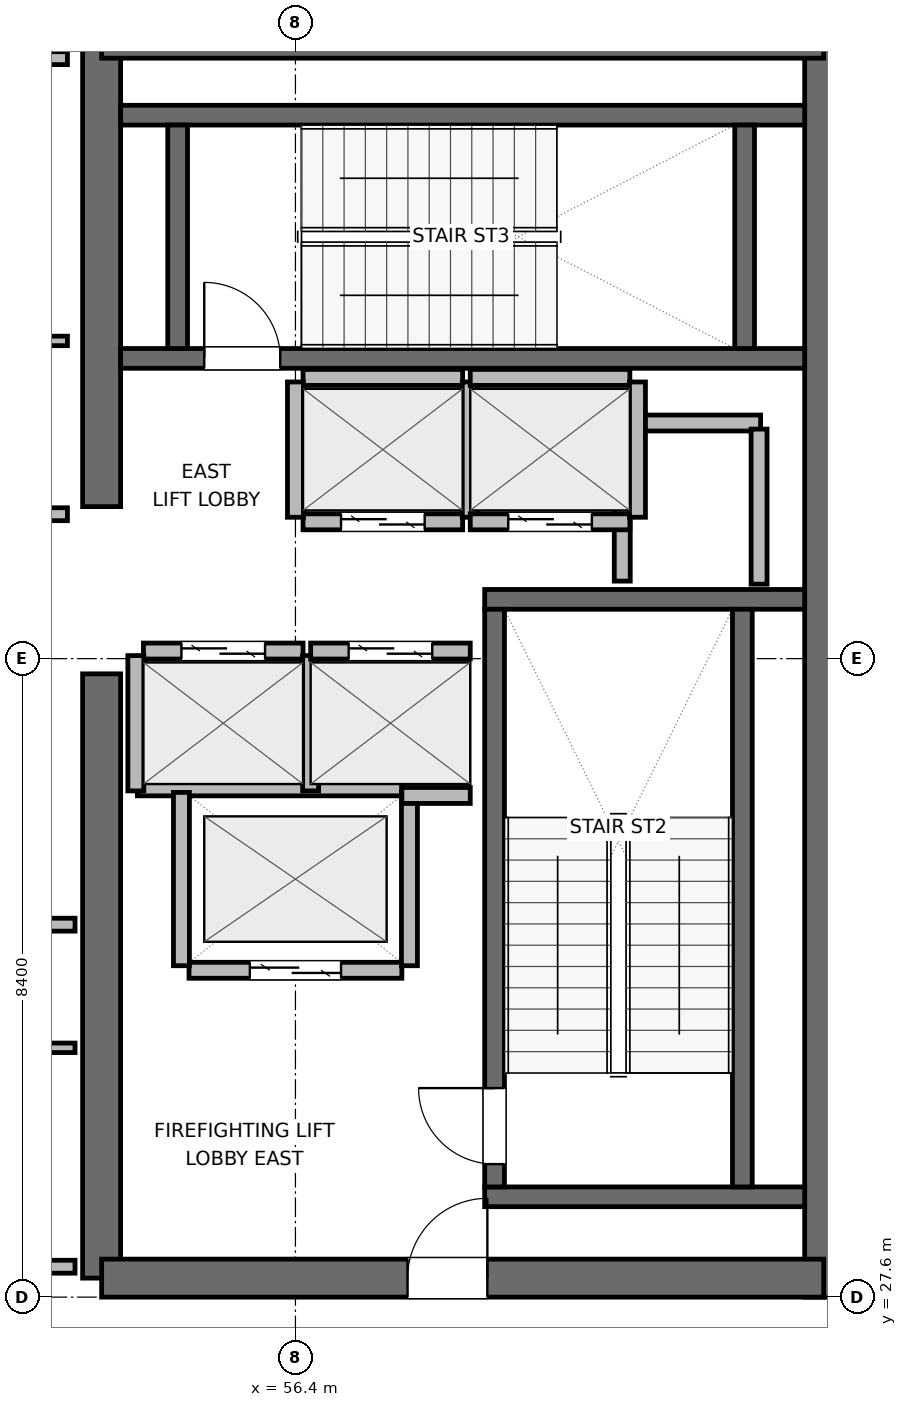
"""IFC4 building model, lengths in metres.
Left out: names, types, materials, properties, quantities, classifications, styles, units other than length and angle.
Written with IfcOpenShell. Run it as: python <this file> out.ifc"""

import sys

from ifc_helpers import new_model, si_unit, direction, frame, frame_2d, origin, place, context, subcontext, project, spatial, rectangle, extrude, element, fill, save


model = new_model("IFC4")
c1 = context("Model", 3, precision=1e-05, world=origin(), true_north=direction((0.0, 1.0)))
c2 = subcontext(c1, "Body", "Model", "MODEL_VIEW")
j1 = project(units=[si_unit("LENGTHUNIT", "METRE"), si_unit("PLANEANGLEUNIT", "RADIAN")], contexts=[c1])
p1 = place(None, origin())
s1 = spatial("IfcSite", under=j1, at=p1, CompositionType="ELEMENT")
p2 = place(p1, origin())
s2 = spatial("IfcBuilding", under=s1, at=p2, CompositionType="ELEMENT")
p3 = place(p2, frame((0.0, 0.0, 350.4)))
s3 = spatial("IfcBuildingStorey", under=s2, at=p3, CompositionType="ELEMENT", Elevation=350.4)
p4 = place(p3, frame((53.85, 27.85, 0.0), z_axis=(0.0, 0.0, 1.0), x_axis=(0.0, 1.0, 0.0)))
e1 = element("IfcWall", 1, at=p4, inside=s3, PredefinedType="SHEAR", context=c2, shape_type="SweptSolid", body=[
    extrude(rectangle(XDim=7.95, YDim=0.5, at=frame_2d((3.975, 0.0))), origin(), (0.0, 0.0, 1.0), 4.5),
])
p5 = place(p3, frame((53.85, 38.0, 0.0), z_axis=(0.0, 0.0, 1.0), x_axis=(0.0, 1.0, 0.0)))
e2 = element("IfcWall", 2, at=p5, inside=s3, PredefinedType="SHEAR", context=c2, shape_type="SweptSolid", body=[
    extrude(rectangle(XDim=6.15, YDim=0.5, at=frame_2d((3.075, 0.0))), origin(), (0.0, 0.0, 1.0), 4.5),
])
p6 = place(p3, frame((63.35, 27.6, 0.0), z_axis=(0.0, 0.0, 1.0), x_axis=(0.0, 1.0, 0.0)))
e3 = element("IfcWall", 3, at=p6, inside=s3, PredefinedType="SHEAR", context=c2, shape_type="SweptSolid", body=[
    extrude(rectangle(XDim=16.8, YDim=0.5, at=frame_2d((8.4, 0.0))), origin(), (0.0, 0.0, 1.0), 4.5),
])
p7 = place(p3, frame((53.85, 27.85, 0.0), z_axis=(0.0, 0.0, 1.0), x_axis=(1.0, 0.0, 0.0)))
e4 = element("IfcWall", 4, at=p7, inside=s3, PredefinedType="SHEAR", context=c2, shape_type="SweptSolid", body=[
    extrude(rectangle(XDim=9.5, YDim=0.5, at=frame_2d((4.75, 0.0))), origin(), (0.0, 0.0, 1.0), 4.5),
])
p8 = place(p7, frame((4.025, 0.0, 0.0)))
e5 = element("IfcOpeningElement", 5, at=p8, cuts=e4, PredefinedType="OPENING", context=c2, shape_type="SweptSolid", body=[
    extrude(rectangle(XDim=1.05, YDim=2.04, at=frame_2d((0.525, 1.02))), frame((0.0, 0.26, 0.0), z_axis=(0.0, -1.0, 0.0), x_axis=(1.0, 0.0, 0.0)), (0.0, 0.0, 1.0), 0.52),
])
p9 = place(p3, frame((53.85, 44.15, 0.0), z_axis=(0.0, 0.0, 1.0), x_axis=(1.0, 0.0, 0.0)))
e6 = element("IfcWall", 6, at=p9, inside=s3, PredefinedType="SHEAR", context=c2, shape_type="SweptSolid", body=[
    extrude(rectangle(XDim=9.5, YDim=0.5, at=frame_2d((4.75, 0.0))), origin(), (0.0, 0.0, 1.0), 4.5),
])
for number, where, z_axis, x_axis in (
    (7, (58.89, 28.92, 0.0), (0.0, 0.0, 1.0), (1.0, 0.0, 0.0)),
    (8, (58.89, 36.78, 0.0), (0.0, 0.0, 1.0), (1.0, 0.0, 0.0)),
):
    element("IfcWall", number, at=place(p3, frame(where, z_axis=z_axis, x_axis=x_axis)), inside=s3, PredefinedType="SHEAR", context=c2, shape_type="SweptSolid", body=[
        extrude(rectangle(XDim=4.21, YDim=0.26, at=frame_2d((2.105, 0.0))), origin(), (0.0, 0.0, 1.0), 4.5),
    ])
p10 = place(p3, frame((59.02, 29.05, 0.0), z_axis=(0.0, 0.0, 1.0), x_axis=(0.0, 1.0, 0.0)))
e9 = element("IfcWall", 9, at=p10, inside=s3, PredefinedType="SHEAR", context=c2, shape_type="SweptSolid", body=[
    extrude(rectangle(XDim=7.6, YDim=0.26, at=frame_2d((3.8, 0.0))), origin(), (0.0, 0.0, 1.0), 4.5),
])
p11 = place(p10, frame((0.3, 0.0, 0.0)))
e10 = element("IfcOpeningElement", 10, at=p11, cuts=e9, PredefinedType="OPENING", context=c2, shape_type="SweptSolid", body=[
    extrude(rectangle(XDim=1.0, YDim=2.04, at=frame_2d((0.5, 1.02))), frame((0.0, 0.14, 0.0), z_axis=(0.0, -1.0, 0.0), x_axis=(1.0, 0.0, 0.0)), (0.0, 0.0, 1.0), 0.28),
])
p12 = place(p3, frame((62.28, 29.05, 0.0), z_axis=(0.0, 0.0, 1.0), x_axis=(0.0, 1.0, 0.0)))
e11 = element("IfcWall", 11, at=p12, inside=s3, PredefinedType="SHEAR", context=c2, shape_type="SweptSolid", body=[
    extrude(rectangle(XDim=7.6, YDim=0.26, at=frame_2d((3.8, 0.0))), origin(), (0.0, 0.0, 1.0), 4.5),
])
p13 = place(p3, frame((54.1, 39.95, 0.0), z_axis=(0.0, 0.0, 1.0), x_axis=(1.0, 0.0, 0.0)))
e12 = element("IfcWall", 12, at=p13, inside=s3, PredefinedType="SHEAR", context=c2, shape_type="SweptSolid", body=[
    extrude(rectangle(XDim=9.0, YDim=0.26, at=frame_2d((4.5, 0.0))), origin(), (0.0, 0.0, 1.0), 4.5),
])
p14 = place(p13, frame((1.1, 0.0, 0.0)))
e13 = element("IfcOpeningElement", 13, at=p14, cuts=e12, PredefinedType="OPENING", context=c2, shape_type="SweptSolid", body=[
    extrude(rectangle(XDim=1.0, YDim=2.04, at=frame_2d((0.5, 1.02))), frame((0.0, 0.14, 0.0), z_axis=(0.0, -1.0, 0.0), x_axis=(1.0, 0.0, 0.0)), (0.0, 0.0, 1.0), 0.28),
])
p15 = place(p3, frame((54.1, 43.15, 0.0), z_axis=(0.0, 0.0, 1.0), x_axis=(1.0, 0.0, 0.0)))
e14 = element("IfcWall", 14, at=p15, inside=s3, PredefinedType="SHEAR", context=c2, shape_type="SweptSolid", body=[
    extrude(rectangle(XDim=9.0, YDim=0.26, at=frame_2d((4.5, 0.0))), origin(), (0.0, 0.0, 1.0), 4.5),
])
for number, where, z_axis, x_axis in (
    (15, (54.85, 40.08, 0.0), (0.0, 0.0, 1.0), (0.0, 1.0, 0.0)),
    (16, (62.31, 40.08, 0.0), (0.0, 0.0, 1.0), (0.0, 1.0, 0.0)),
):
    element("IfcWall", number, at=place(p3, frame(where, z_axis=z_axis, x_axis=x_axis)), inside=s3, PredefinedType="SHEAR", context=c2, shape_type="SweptSolid", body=[
        extrude(rectangle(XDim=2.94, YDim=0.26, at=frame_2d((1.47, 0.0))), origin(), (0.0, 0.0, 1.0), 4.5),
    ])
p16 = place(p3, frame((60.72, 39.1, 0.0), z_axis=(0.0, 0.0, 1.0), x_axis=(1.0, 0.0, 0.0)))
e17 = element("IfcWall", 17, at=p16, inside=s3, PredefinedType="PARTITIONING", context=c2, shape_type="SweptSolid", body=[
    extrude(rectangle(XDim=1.8, YDim=0.21, at=frame_2d((0.9, 0.0))), origin(), (0.0, 0.0, 1.0), 4.2),
])
p17 = place(p3, frame((60.7, 37.02, 0.0), z_axis=(0.0, 0.0, 1.0), x_axis=(0.0, 1.0, 0.0)))
e18 = element("IfcWall", 18, at=p17, inside=s3, PredefinedType="PARTITIONING", context=c2, shape_type="SweptSolid", body=[
    extrude(rectangle(XDim=1.96, YDim=0.21, at=frame_2d((0.98, 0.0))), origin(), (0.0, 0.0, 1.0), 4.2),
])
p18 = place(p3, frame((62.5, 36.98, 0.0), z_axis=(0.0, 0.0, 1.0), x_axis=(0.0, 1.0, 0.0)))
e19 = element("IfcWall", 19, at=p18, inside=s3, PredefinedType="PARTITIONING", context=c2, shape_type="SweptSolid", body=[
    extrude(rectangle(XDim=2.04, YDim=0.21, at=frame_2d((1.02, 0.0))), origin(), (0.0, 0.0, 1.0), 4.2),
])
p19 = place(p3, frame((55.0, 31.9, 0.0), z_axis=(0.0, 0.0, 1.0), x_axis=(1.0, 0.0, 0.0)))
e20 = element("IfcWall", 20, at=p19, inside=s3, PredefinedType="PARTITIONING", context=c2, shape_type="SweptSolid", body=[
    extrude(rectangle(XDim=2.8, YDim=0.21, at=frame_2d((1.4, 0.0))), origin(), (0.0, 0.0, 1.0), 4.2),
])
p20 = place(p19, frame((0.8, 0.0, 0.0)))
e21 = element("IfcOpeningElement", 21, at=p20, cuts=e20, PredefinedType="OPENING", context=c2, shape_type="SweptSolid", body=[
    extrude(rectangle(XDim=1.2, YDim=2.04, at=frame_2d((0.6, 1.02))), frame((0.0, 0.115, 0.0), z_axis=(0.0, -1.0, 0.0), x_axis=(1.0, 0.0, 0.0)), (0.0, 0.0, 1.0), 0.23),
])
p21 = place(p3, frame((54.32, 34.3, 0.0), z_axis=(0.0, 0.0, 1.0), x_axis=(1.0, 0.0, 0.0)))
e22 = element("IfcWall", 22, at=p21, inside=s3, PredefinedType="PARTITIONING", context=c2, shape_type="SweptSolid", body=[
    extrude(rectangle(XDim=3.48, YDim=0.21, at=frame_2d((1.74, 0.0))), origin(), (0.0, 0.0, 1.0), 4.2),
])
for number, where, z_axis, x_axis in (
    (23, (54.9, 31.96, 0.0), (0.0, 0.0, 1.0), (0.0, 1.0, 0.0)),
    (24, (57.9, 31.96, 0.0), (0.0, 0.0, 1.0), (0.0, 1.0, 0.0)),
):
    element("IfcWall", number, at=place(p3, frame(where, z_axis=z_axis, x_axis=x_axis)), inside=s3, PredefinedType="PARTITIONING", context=c2, shape_type="SweptSolid", body=[
        extrude(rectangle(XDim=2.28, YDim=0.21, at=frame_2d((1.14, 0.0))), origin(), (0.0, 0.0, 1.0), 4.2),
    ])
p22 = place(p3, frame((54.4, 36.1, 0.0), z_axis=(0.0, 0.0, 1.0), x_axis=(1.0, 0.0, 0.0)))
e25 = element("IfcWall", 25, at=p22, inside=s3, PredefinedType="PARTITIONING", context=c2, shape_type="SweptSolid", body=[
    extrude(rectangle(XDim=2.1, YDim=0.21, at=frame_2d((1.05, 0.0))), origin(), (0.0, 0.0, 1.0), 4.2),
])
p23 = place(p22, frame((0.5, 0.0, 0.0)))
e26 = element("IfcOpeningElement", 26, at=p23, cuts=e25, PredefinedType="OPENING", context=c2, shape_type="SweptSolid", body=[
    extrude(rectangle(XDim=1.1, YDim=2.04, at=frame_2d((0.55, 1.02))), frame((0.0, 0.115, 0.0), z_axis=(0.0, -1.0, 0.0), x_axis=(1.0, 0.0, 0.0)), (0.0, 0.0, 1.0), 0.23),
])
for number, where, z_axis, x_axis in (
    (27, (54.3, 34.26, 0.0), (0.0, 0.0, 1.0), (0.0, 1.0, 0.0)),
    (28, (56.6, 34.26, 0.0), (0.0, 0.0, 1.0), (0.0, 1.0, 0.0)),
):
    element("IfcWall", number, at=place(p3, frame(where, z_axis=z_axis, x_axis=x_axis)), inside=s3, PredefinedType="PARTITIONING", context=c2, shape_type="SweptSolid", body=[
        extrude(rectangle(XDim=1.78, YDim=0.21, at=frame_2d((0.89, 0.0))), origin(), (0.0, 0.0, 1.0), 4.2),
    ])
p24 = place(p3, frame((56.6, 36.1, 0.0), z_axis=(0.0, 0.0, 1.0), x_axis=(1.0, 0.0, 0.0)))
e29 = element("IfcWall", 29, at=p24, inside=s3, PredefinedType="PARTITIONING", context=c2, shape_type="SweptSolid", body=[
    extrude(rectangle(XDim=2.1, YDim=0.21, at=frame_2d((1.05, 0.0))), origin(), (0.0, 0.0, 1.0), 4.2),
])
p25 = place(p24, frame((0.5, 0.0, 0.0)))
e30 = element("IfcOpeningElement", 30, at=p25, cuts=e29, PredefinedType="OPENING", context=c2, shape_type="SweptSolid", body=[
    extrude(rectangle(XDim=1.1, YDim=2.04, at=frame_2d((0.55, 1.02))), frame((0.0, 0.115, 0.0), z_axis=(0.0, -1.0, 0.0), x_axis=(1.0, 0.0, 0.0)), (0.0, 0.0, 1.0), 0.23),
])
p26 = place(p3, frame((57.8, 34.2, 0.0), z_axis=(0.0, 0.0, 1.0), x_axis=(1.0, 0.0, 0.0)))
e31 = element("IfcWall", 31, at=p26, inside=s3, PredefinedType="PARTITIONING", context=c2, shape_type="SweptSolid", body=[
    extrude(rectangle(XDim=0.9, YDim=0.21, at=frame_2d((0.45, 0.0))), origin(), (0.0, 0.0, 1.0), 4.2),
])
p27 = place(p3, frame((56.5, 37.8, 0.0), z_axis=(0.0, 0.0, 1.0), x_axis=(1.0, 0.0, 0.0)))
e32 = element("IfcWall", 32, at=p27, inside=s3, PredefinedType="PARTITIONING", context=c2, shape_type="SweptSolid", body=[
    extrude(rectangle(XDim=2.1, YDim=0.21, at=frame_2d((1.05, 0.0))), origin(), (0.0, 0.0, 1.0), 4.2),
])
p28 = place(p27, frame((0.5, 0.0, 0.0)))
e33 = element("IfcOpeningElement", 33, at=p28, cuts=e32, PredefinedType="OPENING", context=c2, shape_type="SweptSolid", body=[
    extrude(rectangle(XDim=1.1, YDim=2.04, at=frame_2d((0.55, 1.02))), frame((0.0, 0.115, 0.0), z_axis=(0.0, -1.0, 0.0), x_axis=(1.0, 0.0, 0.0)), (0.0, 0.0, 1.0), 0.23),
])
p29 = place(p3, frame((56.5, 39.7, 0.0), z_axis=(0.0, 0.0, 1.0), x_axis=(1.0, 0.0, 0.0)))
e34 = element("IfcWall", 34, at=p29, inside=s3, PredefinedType="PARTITIONING", context=c2, shape_type="SweptSolid", body=[
    extrude(rectangle(XDim=2.1, YDim=0.21, at=frame_2d((1.05, 0.0))), origin(), (0.0, 0.0, 1.0), 4.2),
])
for number, where, z_axis, x_axis in (
    (35, (56.4, 37.86, 0.0), (0.0, 0.0, 1.0), (0.0, 1.0, 0.0)),
    (36, (58.7, 37.86, 0.0), (0.0, 0.0, 1.0), (0.0, 1.0, 0.0)),
):
    element("IfcWall", number, at=place(p3, frame(where, z_axis=z_axis, x_axis=x_axis)), inside=s3, PredefinedType="PARTITIONING", context=c2, shape_type="SweptSolid", body=[
        extrude(rectangle(XDim=1.78, YDim=0.21, at=frame_2d((0.89, 0.0))), origin(), (0.0, 0.0, 1.0), 4.2),
    ])
p30 = place(p3, frame((58.7, 37.8, 0.0), z_axis=(0.0, 0.0, 1.0), x_axis=(1.0, 0.0, 0.0)))
e37 = element("IfcWall", 37, at=p30, inside=s3, PredefinedType="PARTITIONING", context=c2, shape_type="SweptSolid", body=[
    extrude(rectangle(XDim=2.1, YDim=0.21, at=frame_2d((1.05, 0.0))), origin(), (0.0, 0.0, 1.0), 4.2),
])
p31 = place(p30, frame((0.5, 0.0, 0.0)))
e38 = element("IfcOpeningElement", 38, at=p31, cuts=e37, PredefinedType="OPENING", context=c2, shape_type="SweptSolid", body=[
    extrude(rectangle(XDim=1.1, YDim=2.04, at=frame_2d((0.55, 1.02))), frame((0.0, 0.115, 0.0), z_axis=(0.0, -1.0, 0.0), x_axis=(1.0, 0.0, 0.0)), (0.0, 0.0, 1.0), 0.23),
])
p32 = place(p3, frame((58.7, 39.7, 0.0), z_axis=(0.0, 0.0, 1.0), x_axis=(1.0, 0.0, 0.0)))
e39 = element("IfcWall", 39, at=p32, inside=s3, PredefinedType="PARTITIONING", context=c2, shape_type="SweptSolid", body=[
    extrude(rectangle(XDim=2.1, YDim=0.21, at=frame_2d((1.05, 0.0))), origin(), (0.0, 0.0, 1.0), 4.2),
])
p33 = place(p3, frame((60.9, 37.86, 0.0), z_axis=(0.0, 0.0, 1.0), x_axis=(0.0, 1.0, 0.0)))
e40 = element("IfcWall", 40, at=p33, inside=s3, PredefinedType="PARTITIONING", context=c2, shape_type="SweptSolid", body=[
    extrude(rectangle(XDim=1.78, YDim=0.21, at=frame_2d((0.89, 0.0))), origin(), (0.0, 0.0, 1.0), 4.2),
])
p34 = place(p3, frame((49.287, 28.0, 0.0), z_axis=(0.0, 0.0, 1.0), x_axis=(1.0, 0.0, 0.0)))
e41 = element("IfcWall", 41, at=p34, inside=s3, PredefinedType="PARTITIONING", context=c2, shape_type="SweptSolid", body=[
    extrude(rectangle(XDim=4.213, YDim=0.17, at=frame_2d((2.106, 0.0))), origin(), (0.0, 0.0, 1.0), 3.285),
])
p35 = place(p3, frame((52.2, 32.5, 0.0), z_axis=(0.0, 0.0, 1.0), x_axis=(1.0, 0.0, 0.0)))
e42 = element("IfcWall", 42, at=p35, inside=s3, PredefinedType="PARTITIONING", context=c2, shape_type="SweptSolid", body=[
    extrude(rectangle(XDim=1.3, YDim=0.17, at=frame_2d((0.65, 0.0))), origin(), (0.0, 0.0, 1.0), 4.2),
])
p36 = place(p3, frame((49.287, 30.88, 0.0), z_axis=(0.0, 0.0, 1.0), x_axis=(1.0, 0.0, 0.0)))
e43 = element("IfcWall", 43, at=p36, inside=s3, PredefinedType="PARTITIONING", context=c2, shape_type="SweptSolid", body=[
    extrude(rectangle(XDim=4.213, YDim=0.125, at=frame_2d((2.106, 0.0))), origin(), (0.0, 0.0, 1.0), 4.2),
])
p37 = place(p3, frame((49.287, 37.9, 0.0), z_axis=(0.0, 0.0, 1.0), x_axis=(1.0, 0.0, 0.0)))
e44 = element("IfcWall", 44, at=p37, inside=s3, PredefinedType="PARTITIONING", context=c2, shape_type="SweptSolid", body=[
    extrude(rectangle(XDim=4.113, YDim=0.17, at=frame_2d((2.056, 0.0))), origin(), (0.0, 0.0, 1.0), 4.2),
])
p38 = place(p3, frame((49.287, 43.9, 0.0), z_axis=(0.0, 0.0, 1.0), x_axis=(1.0, 0.0, 0.0)))
e45 = element("IfcWall", 45, at=p38, inside=s3, PredefinedType="PARTITIONING", context=c2, shape_type="SweptSolid", body=[
    extrude(rectangle(XDim=4.113, YDim=0.17, at=frame_2d((2.056, 0.0))), origin(), (0.0, 0.0, 1.0), 3.285),
])
p39 = place(p3, frame((49.287, 40.18, 0.0), z_axis=(0.0, 0.0, 1.0), x_axis=(1.0, 0.0, 0.0)))
e46 = element("IfcWall", 46, at=p39, inside=s3, PredefinedType="PARTITIONING", context=c2, shape_type="SweptSolid", body=[
    extrude(rectangle(XDim=4.113, YDim=0.125, at=frame_2d((2.056, 0.0))), origin(), (0.0, 0.0, 1.0), 4.2),
])
p40 = place(p11, origin())
e47 = element("IfcDoor", 47, at=p40, inside=s3, OperationType="SINGLE_SWING_RIGHT", PredefinedType="DOOR", context=c2, shape_type="SweptSolid", body=[
    extrude(rectangle(XDim=1.0, YDim=2.04, at=frame_2d((0.5, 1.02))), frame((0.0, 0.025, 0.0), z_axis=(0.0, -1.0, 0.0), x_axis=(1.0, 0.0, 0.0)), (0.0, 0.0, 1.0), 0.05),
])
fill(e10, e47)
p41 = place(p14, origin())
e48 = element("IfcDoor", 48, at=p41, inside=s3, OperationType="SINGLE_SWING_LEFT", PredefinedType="DOOR", context=c2, shape_type="SweptSolid", body=[
    extrude(rectangle(XDim=1.0, YDim=2.04, at=frame_2d((0.5, 1.02))), frame((0.0, 0.025, 0.0), z_axis=(0.0, -1.0, 0.0), x_axis=(1.0, 0.0, 0.0)), (0.0, 0.0, 1.0), 0.05),
])
fill(e13, e48)
p42 = place(p20, origin())
e49 = element("IfcDoor", 49, at=p42, inside=s3, OperationType="DOUBLE_DOOR_SLIDING", PredefinedType="DOOR", context=c2, shape_type="SweptSolid", body=[
    extrude(rectangle(XDim=1.2, YDim=2.04, at=frame_2d((0.6, 1.02))), frame((0.0, 0.025, 0.0), z_axis=(0.0, -1.0, 0.0), x_axis=(1.0, 0.0, 0.0)), (0.0, 0.0, 1.0), 0.05),
])
fill(e21, e49)
p43 = place(p23, origin())
e50 = element("IfcDoor", 50, at=p43, inside=s3, OperationType="DOUBLE_DOOR_SLIDING", PredefinedType="DOOR", context=c2, shape_type="SweptSolid", body=[
    extrude(rectangle(XDim=1.1, YDim=2.04, at=frame_2d((0.55, 1.02))), frame((0.0, 0.025, 0.0), z_axis=(0.0, -1.0, 0.0), x_axis=(1.0, 0.0, 0.0)), (0.0, 0.0, 1.0), 0.05),
])
fill(e26, e50)
p44 = place(p25, origin())
e51 = element("IfcDoor", 51, at=p44, inside=s3, OperationType="DOUBLE_DOOR_SLIDING", PredefinedType="DOOR", context=c2, shape_type="SweptSolid", body=[
    extrude(rectangle(XDim=1.1, YDim=2.04, at=frame_2d((0.55, 1.02))), frame((0.0, 0.025, 0.0), z_axis=(0.0, -1.0, 0.0), x_axis=(1.0, 0.0, 0.0)), (0.0, 0.0, 1.0), 0.05),
])
fill(e30, e51)
p45 = place(p28, origin())
e52 = element("IfcDoor", 52, at=p45, inside=s3, OperationType="DOUBLE_DOOR_SLIDING", PredefinedType="DOOR", context=c2, shape_type="SweptSolid", body=[
    extrude(rectangle(XDim=1.1, YDim=2.04, at=frame_2d((0.55, 1.02))), frame((0.0, 0.025, 0.0), z_axis=(0.0, -1.0, 0.0), x_axis=(1.0, 0.0, 0.0)), (0.0, 0.0, 1.0), 0.05),
])
fill(e33, e52)
p46 = place(p31, origin())
e53 = element("IfcDoor", 53, at=p46, inside=s3, OperationType="DOUBLE_DOOR_SLIDING", PredefinedType="DOOR", context=c2, shape_type="SweptSolid", body=[
    extrude(rectangle(XDim=1.1, YDim=2.04, at=frame_2d((0.55, 1.02))), frame((0.0, 0.025, 0.0), z_axis=(0.0, -1.0, 0.0), x_axis=(1.0, 0.0, 0.0)), (0.0, 0.0, 1.0), 0.05),
])
fill(e38, e53)
p47 = place(p8, origin())
e54 = element("IfcDoor", 54, at=p47, inside=s3, OperationType="SINGLE_SWING_RIGHT", PredefinedType="DOOR", context=c2, shape_type="SweptSolid", body=[
    extrude(rectangle(XDim=1.05, YDim=2.04, at=frame_2d((0.525, 1.02))), frame((0.0, 0.025, 0.0), z_axis=(0.0, -1.0, 0.0), x_axis=(1.0, 0.0, 0.0)), (0.0, 0.0, 1.0), 0.05),
])
fill(e5, e54)
save(model, sys.argv[1])
